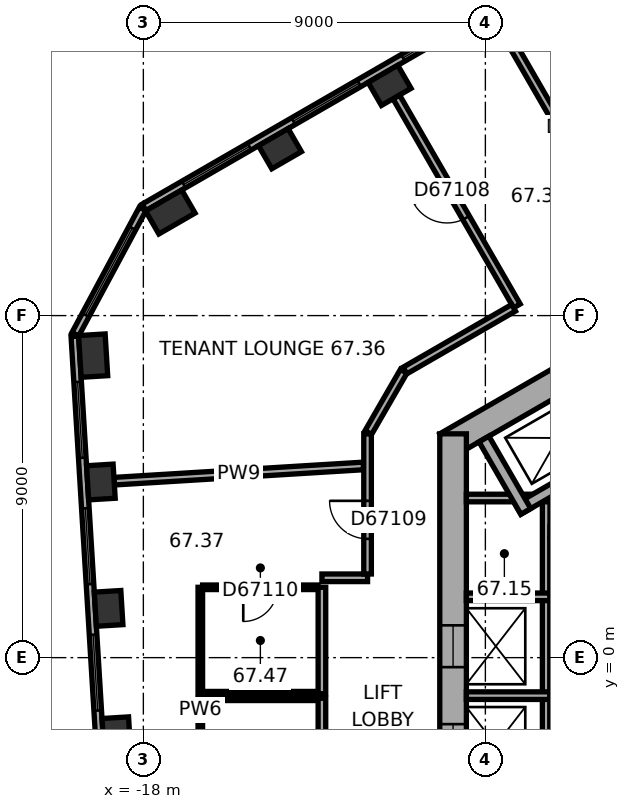
"""IFC4 building model, lengths in metres.
Left out: names, types, materials, properties, quantities, classifications, styles, units other than length and angle.
Written with IfcOpenShell. Run it as: python <this file> out.ifc"""

import sys

from ifc_helpers import new_model, si_unit, direction, frame, frame_2d, origin, origin_2d, place, context, subcontext, project, spatial, rectangle, extrude, element, fill, save


model = new_model("IFC4")
c1 = context("Model", 3, precision=1e-05, world=origin(), true_north=direction((0.0, 1.0)))
c2 = subcontext(c1, "Body", "Model", "MODEL_VIEW")
j1 = project(units=[si_unit("LENGTHUNIT", "METRE"), si_unit("PLANEANGLEUNIT", "RADIAN")], contexts=[c1])
p1 = place(None, origin())
s1 = spatial("IfcSite", under=j1, at=p1, CompositionType="ELEMENT")
p2 = place(p1, origin())
s2 = spatial("IfcBuilding", under=s1, at=p2, CompositionType="ELEMENT")
p3 = place(p2, frame((0.0, 0.0, 270.9)))
s3 = spatial("IfcBuildingStorey", under=s2, at=p3, CompositionType="ELEMENT", Elevation=270.9)
for number, where, z_axis, x_axis in (
    (1, (-11.52, 15.057, 0.0), (0.0, 0.0, 1.0), (-0.866, -0.5, 0.0)),
    (2, (-14.406, 13.391, 0.0), (0.0, 0.0, 1.0), (-0.866, -0.5, 0.0)),
):
    element("IfcColumn", number, at=place(p3, frame(where, z_axis=z_axis, x_axis=x_axis)), inside=s3, PredefinedType="COLUMN", context=c2, shape_type="SweptSolid", body=[
        extrude(rectangle(XDim=0.9, YDim=0.7, at=origin_2d()), origin(), (0.0, 0.0, 1.0), 3.7),
    ])
for number, where, z_axis, x_axis in (
    (3, (-17.291, 11.726, 0.0), (0.0, 0.0, 1.0), (-0.866, -0.5, 0.0)),
    (4, (-19.321, 7.947, 0.0), (0.0, 0.0, 1.0), (0.061, -0.998, 0.0)),
):
    element("IfcColumn", number, at=place(p3, frame(where, z_axis=z_axis, x_axis=x_axis)), inside=s3, PredefinedType="COLUMN", context=c2, shape_type="SweptSolid", body=[
        extrude(rectangle(XDim=1.1, YDim=0.7, at=origin_2d()), origin(), (0.0, 0.0, 1.0), 3.7),
    ])
for number, where, z_axis, x_axis in (
    (5, (-19.118, 4.621, 0.0), (0.0, 0.0, 1.0), (0.061, -0.998, 0.0)),
    (6, (-18.914, 1.296, 0.0), (0.0, 0.0, 1.0), (0.061, -0.998, 0.0)),
    (7, (-18.711, -2.03, 0.0), (0.0, 0.0, 1.0), (0.061, -0.998, 0.0)),
):
    element("IfcColumn", number, at=place(p3, frame(where, z_axis=z_axis, x_axis=x_axis)), inside=s3, PredefinedType="COLUMN", context=c2, shape_type="SweptSolid", body=[
        extrude(rectangle(XDim=0.9, YDim=0.7, at=origin_2d()), origin(), (0.0, 0.0, 1.0), 3.7),
    ])
p4 = place(p3, frame((0.175, 11.475, 0.0), z_axis=(0.0, 0.0, 1.0), x_axis=(-0.866026453023, -0.499998182661, 0.0)))
e8 = element("IfcWall", 8, at=p4, inside=s3, PredefinedType="SHEAR", context=c2, shape_type="SweptSolid", body=[
    extrude(rectangle(XDim=11.778, YDim=0.7, at=frame_2d((5.889, 0.0))), origin(), (0.0, 0.0, 1.0), 3.7),
])
p5 = place(p4, frame((6.089, 0.0, 0.0)))
e9 = element("IfcOpeningElement", 9, at=p5, cuts=e8, PredefinedType="OPENING", context=c2, shape_type="SweptSolid", body=[
    extrude(rectangle(XDim=1.5, YDim=2.1, at=frame_2d((0.75, 1.05))), frame((0.0, 0.36, 0.0), z_axis=(0.0, -1.0, 0.0), x_axis=(1.0, 0.0, 0.0)), (0.0, 0.0, 1.0), 0.72),
])
p6 = place(p4, frame((1.639, 0.0, 0.0)))
e10 = element("IfcOpeningElement", 10, at=p6, cuts=e8, PredefinedType="OPENING", context=c2, shape_type="SweptSolid", body=[
    extrude(rectangle(XDim=0.9, YDim=2.1, at=frame_2d((0.45, 1.05))), frame((0.0, 0.36, 0.0), z_axis=(0.0, -1.0, 0.0), x_axis=(1.0, 0.0, 0.0)), (0.0, 0.0, 1.0), 0.72),
])
p7 = place(p4, frame((4.239, 0.0, 0.0)))
e11 = element("IfcOpeningElement", 11, at=p7, cuts=e8, PredefinedType="OPENING", context=c2, shape_type="SweptSolid", body=[
    extrude(rectangle(XDim=0.9, YDim=2.1, at=frame_2d((0.45, 1.05))), frame((0.0, 0.36, 0.0), z_axis=(0.0, -1.0, 0.0), x_axis=(1.0, 0.0, 0.0)), (0.0, 0.0, 1.0), 0.72),
])
p8 = place(p3, frame((-9.85, 5.889, 0.0), z_axis=(0.0, 0.0, 1.0), x_axis=(0.0, -1.0, 0.0)))
e12 = element("IfcWall", 12, at=p8, inside=s3, PredefinedType="SHEAR", context=c2, shape_type="SweptSolid", body=[
    extrude(rectangle(XDim=11.778, YDim=0.7, at=frame_2d((5.889, 0.0))), origin(), (0.0, 0.0, 1.0), 3.7),
])
p9 = place(p8, frame((5.039, 0.0, 0.0)))
e13 = element("IfcOpeningElement", 13, at=p9, cuts=e12, PredefinedType="OPENING", context=c2, shape_type="SweptSolid", body=[
    extrude(rectangle(XDim=1.1, YDim=2.1, at=frame_2d((0.55, 1.05))), frame((0.0, 0.36, 0.0), z_axis=(0.0, -1.0, 0.0), x_axis=(1.0, 0.0, 0.0)), (0.0, 0.0, 1.0), 0.72),
])
p10 = place(p8, frame((7.639, 0.0, 0.0)))
e14 = element("IfcOpeningElement", 14, at=p10, cuts=e12, PredefinedType="OPENING", context=c2, shape_type="SweptSolid", body=[
    extrude(rectangle(XDim=1.1, YDim=2.1, at=frame_2d((0.55, 1.05))), frame((0.0, 0.36, 0.0), z_axis=(0.0, -1.0, 0.0), x_axis=(1.0, 0.0, 0.0)), (0.0, 0.0, 1.0), 0.72),
])
p11 = place(p3, frame((-2.624, 20.713, 0.0), z_axis=(0.0, 0.0, 1.0), x_axis=(-0.866026460444, -0.499998169808, 0.0)))
e15 = element("IfcWall", 15, at=p11, inside=s3, PredefinedType="STANDARD", context=c2, shape_type="SweptSolid", body=[
    extrude(rectangle(XDim=17.731, YDim=0.2, at=frame_2d((8.866, 0.0))), origin(), (0.0, 0.0, 1.0), 3.7),
])
p12 = place(p11, frame((1.203, 0.0, 0.9)))
e16 = element("IfcOpeningElement", 16, at=p12, cuts=e15, PredefinedType="OPENING", context=c2, shape_type="SweptSolid", body=[
    extrude(rectangle(XDim=2.0, YDim=2.0, at=frame_2d((1.0, 1.0))), frame((0.0, 0.11, 0.0), z_axis=(0.0, -1.0, 0.0), x_axis=(1.0, 0.0, 0.0)), (0.0, 0.0, 1.0), 0.22),
])
p13 = place(p11, frame((4.535, 0.0, 0.9)))
e17 = element("IfcOpeningElement", 17, at=p13, cuts=e15, PredefinedType="OPENING", context=c2, shape_type="SweptSolid", body=[
    extrude(rectangle(XDim=2.0, YDim=2.0, at=frame_2d((1.0, 1.0))), frame((0.0, 0.11, 0.0), z_axis=(0.0, -1.0, 0.0), x_axis=(1.0, 0.0, 0.0)), (0.0, 0.0, 1.0), 0.22),
])
p14 = place(p11, frame((7.867, 0.0, 0.9)))
e18 = element("IfcOpeningElement", 18, at=p14, cuts=e15, PredefinedType="OPENING", context=c2, shape_type="SweptSolid", body=[
    extrude(rectangle(XDim=2.0, YDim=2.0, at=frame_2d((1.0, 1.0))), frame((0.0, 0.11, 0.0), z_axis=(0.0, -1.0, 0.0), x_axis=(1.0, 0.0, 0.0)), (0.0, 0.0, 1.0), 0.22),
])
p15 = place(p11, frame((11.198, 0.0, 0.9)))
e19 = element("IfcOpeningElement", 19, at=p15, cuts=e15, PredefinedType="OPENING", context=c2, shape_type="SweptSolid", body=[
    extrude(rectangle(XDim=2.0, YDim=2.0, at=frame_2d((1.0, 1.0))), frame((0.0, 0.11, 0.0), z_axis=(0.0, -1.0, 0.0), x_axis=(1.0, 0.0, 0.0)), (0.0, 0.0, 1.0), 0.22),
])
p16 = place(p11, frame((14.53, 0.0, 0.9)))
e20 = element("IfcOpeningElement", 20, at=p16, cuts=e15, PredefinedType="OPENING", context=c2, shape_type="SweptSolid", body=[
    extrude(rectangle(XDim=2.0, YDim=2.0, at=frame_2d((1.0, 1.0))), frame((0.0, 0.11, 0.0), z_axis=(0.0, -1.0, 0.0), x_axis=(1.0, 0.0, 0.0)), (0.0, 0.0, 1.0), 0.22),
])
p17 = place(p3, frame((-18.018, 11.808, 0.0), z_axis=(0.0, 0.0, 1.0), x_axis=(-0.473318619185, -0.880891301315, 0.0)))
e21 = element("IfcWall", 21, at=p17, inside=s3, PredefinedType="STANDARD", context=c2, shape_type="SweptSolid", body=[
    extrude(rectangle(XDim=3.747, YDim=0.2, at=frame_2d((1.874, 0.0))), origin(), (0.0, 0.0, 1.0), 3.7),
])
p18 = place(p17, frame((0.573, 0.0, 0.9)))
e22 = element("IfcOpeningElement", 22, at=p18, cuts=e21, PredefinedType="OPENING", context=c2, shape_type="SweptSolid", body=[
    extrude(rectangle(XDim=2.6, YDim=2.0, at=frame_2d((1.3, 1.0))), frame((0.0, 0.11, 0.0), z_axis=(0.0, -1.0, 0.0), x_axis=(1.0, 0.0, 0.0)), (0.0, 0.0, 1.0), 0.22),
])
p19 = place(p3, frame((-19.803, 8.454, 0.0), z_axis=(0.0, 0.0, 1.0), x_axis=(0.061036717565, -0.998135521414, 0.0)))
e23 = element("IfcWall", 23, at=p19, inside=s3, PredefinedType="STANDARD", context=c2, shape_type="SweptSolid", body=[
    extrude(rectangle(XDim=17.731, YDim=0.2, at=frame_2d((8.866, 0.0))), origin(), (0.0, 0.0, 1.0), 3.7),
])
p20 = place(p19, frame((1.202, 0.0, 0.9)))
e24 = element("IfcOpeningElement", 24, at=p20, cuts=e23, PredefinedType="OPENING", context=c2, shape_type="SweptSolid", body=[
    extrude(rectangle(XDim=2.0, YDim=2.0, at=frame_2d((1.0, 1.0))), frame((0.0, 0.11, 0.0), z_axis=(0.0, -1.0, 0.0), x_axis=(1.0, 0.0, 0.0)), (0.0, 0.0, 1.0), 0.22),
])
p21 = place(p19, frame((4.533, 0.0, 0.9)))
e25 = element("IfcOpeningElement", 25, at=p21, cuts=e23, PredefinedType="OPENING", context=c2, shape_type="SweptSolid", body=[
    extrude(rectangle(XDim=2.0, YDim=2.0, at=frame_2d((1.0, 1.0))), frame((0.0, 0.11, 0.0), z_axis=(0.0, -1.0, 0.0), x_axis=(1.0, 0.0, 0.0)), (0.0, 0.0, 1.0), 0.22),
])
p22 = place(p19, frame((7.865, 0.0, 0.9)))
e26 = element("IfcOpeningElement", 26, at=p22, cuts=e23, PredefinedType="OPENING", context=c2, shape_type="SweptSolid", body=[
    extrude(rectangle(XDim=2.0, YDim=2.0, at=frame_2d((1.0, 1.0))), frame((0.0, 0.11, 0.0), z_axis=(0.0, -1.0, 0.0), x_axis=(1.0, 0.0, 0.0)), (0.0, 0.0, 1.0), 0.22),
])
p23 = place(p19, frame((11.197, 0.0, 0.9)))
e27 = element("IfcOpeningElement", 27, at=p23, cuts=e23, PredefinedType="OPENING", context=c2, shape_type="SweptSolid", body=[
    extrude(rectangle(XDim=2.0, YDim=2.0, at=frame_2d((1.0, 1.0))), frame((0.0, 0.11, 0.0), z_axis=(0.0, -1.0, 0.0), x_axis=(1.0, 0.0, 0.0)), (0.0, 0.0, 1.0), 0.22),
])
p24 = place(p19, frame((14.528, 0.0, 0.9)))
e28 = element("IfcOpeningElement", 28, at=p24, cuts=e23, PredefinedType="OPENING", context=c2, shape_type="SweptSolid", body=[
    extrude(rectangle(XDim=2.0, YDim=2.0, at=frame_2d((1.0, 1.0))), frame((0.0, 0.11, 0.0), z_axis=(0.0, -1.0, 0.0), x_axis=(1.0, 0.0, 0.0)), (0.0, 0.0, 1.0), 0.22),
])
p25 = place(p3, frame((-7.4, 4.3, 0.0), z_axis=(0.0, 0.0, 1.0), x_axis=(0.0, -1.0, 0.0)))
e29 = element("IfcWall", 29, at=p25, inside=s3, PredefinedType="PARTITIONING", context=c2, shape_type="SweptSolid", body=[
    extrude(rectangle(XDim=8.0, YDim=0.2, at=frame_2d((4.0, 0.0))), origin(), (0.0, 0.0, 1.0), 3.42),
])
for number, where, z_axis, x_axis in (
    (30, (-7.3, 4.2, 0.0), (0.0, 0.0, 1.0), (-1.0, 0.0, 0.0)),
    (31, (-7.3, 1.6, 0.0), (0.0, 0.0, 1.0), (-1.0, 0.0, 0.0)),
    (32, (-7.3, -1.0, 0.0), (0.0, 0.0, 1.0), (-1.0, 0.0, 0.0)),
):
    element("IfcWall", number, at=place(p3, frame(where, z_axis=z_axis, x_axis=x_axis)), inside=s3, PredefinedType="PARTITIONING", context=c2, shape_type="SweptSolid", body=[
        extrude(rectangle(XDim=2.2, YDim=0.2, at=frame_2d((1.1, 0.0))), origin(), (0.0, 0.0, 1.0), 3.42),
    ])
p26 = place(p3, frame((-5.24, 5.577, 0.0), z_axis=(0.0, 0.0, 1.0), x_axis=(-0.866014461049, -0.500018952895, 0.0)))
e33 = element("IfcWall", 33, at=p26, inside=s3, PredefinedType="SHEAR", context=c2, shape_type="SweptSolid", body=[
    extrude(rectangle(XDim=3.35, YDim=0.3, at=frame_2d((1.675, 0.0))), origin(), (0.0, 0.0, 1.0), 3.42),
])
p27 = place(p3, frame((-7.937, 3.847, 0.0), z_axis=(0.0, 0.0, 1.0), x_axis=(-0.50002983664, 0.866008176907, 0.0)))
e34 = element("IfcWall", 34, at=p27, inside=s3, PredefinedType="SHEAR", context=c2, shape_type="SweptSolid", body=[
    extrude(rectangle(XDim=2.2, YDim=0.3, at=frame_2d((1.1, 0.0))), origin(), (0.0, 0.0, 1.0), 3.42),
])
p28 = place(p3, frame((-18.768, 4.643, 0.0), z_axis=(0.0, 0.0, 1.0), x_axis=(0.99813496285, 0.0610458511, 0.0)))
e35 = element("IfcWall", 35, at=p28, inside=s3, PredefinedType="PARTITIONING", context=c2, shape_type="SweptSolid", body=[
    extrude(rectangle(XDim=6.571, YDim=0.2, at=frame_2d((3.285, 0.0))), origin(), (0.0, 0.0, 1.0), 3.42),
])
p29 = place(p3, frame((-16.501, -3.869, 0.0), z_axis=(0.0, 0.0, 1.0), x_axis=(0.0, 1.0, 0.0)))
e36 = element("IfcWall", 36, at=p29, inside=s3, PredefinedType="PARTITIONING", context=c2, shape_type="SweptSolid", body=[
    extrude(rectangle(XDim=2.8, YDim=0.12, at=frame_2d((1.4, 0.0))), origin(), (0.0, 0.0, 1.0), 3.42),
])
p30 = place(p29, frame((0.95, 0.0, 0.0)))
e37 = element("IfcOpeningElement", 37, at=p30, cuts=e36, PredefinedType="OPENING", context=c2, shape_type="SweptSolid", body=[
    extrude(rectangle(XDim=0.9, YDim=2.1, at=frame_2d((0.45, 1.05))), frame((0.0, 0.07, 0.0), z_axis=(0.0, -1.0, 0.0), x_axis=(1.0, 0.0, 0.0)), (0.0, 0.0, 1.0), 0.14),
])
p31 = place(p3, frame((-16.501, -0.949, 0.0), z_axis=(0.0, 0.0, 1.0), x_axis=(0.0, 1.0, 0.0)))
e38 = element("IfcWall", 38, at=p31, inside=s3, PredefinedType="PARTITIONING", context=c2, shape_type="SweptSolid", body=[
    extrude(rectangle(XDim=2.8, YDim=0.12, at=frame_2d((1.4, 0.0))), origin(), (0.0, 0.0, 1.0), 3.42),
])
p32 = place(p3, frame((-16.441, -1.069, 0.0), z_axis=(0.0, 0.0, 1.0), x_axis=(1.0, 0.0, 0.0)))
e39 = element("IfcWall", 39, at=p32, inside=s3, PredefinedType="PARTITIONING", context=c2, shape_type="SweptSolid", body=[
    extrude(rectangle(XDim=3.04, YDim=0.12, at=frame_2d((1.52, 0.0))), origin(), (0.0, 0.0, 1.0), 3.42),
])
p33 = place(p3, frame((-16.441, 1.851, 0.0), z_axis=(0.0, 0.0, 1.0), x_axis=(1.0, 0.0, 0.0)))
e40 = element("IfcWall", 40, at=p33, inside=s3, PredefinedType="PARTITIONING", context=c2, shape_type="SweptSolid", body=[
    extrude(rectangle(XDim=3.04, YDim=0.12, at=frame_2d((1.52, 0.0))), origin(), (0.0, 0.0, 1.0), 3.42),
])
p34 = place(p33, frame((1.07, 0.0, 0.0)))
e41 = element("IfcOpeningElement", 41, at=p34, cuts=e40, PredefinedType="OPENING", context=c2, shape_type="SweptSolid", body=[
    extrude(rectangle(XDim=0.9, YDim=2.1, at=frame_2d((0.45, 1.05))), frame((0.0, 0.07, 0.0), z_axis=(0.0, -1.0, 0.0), x_axis=(1.0, 0.0, 0.0)), (0.0, 0.0, 1.0), 0.14),
])
p35 = place(p3, frame((-13.401, -0.949, 0.0), z_axis=(0.0, 0.0, 1.0), x_axis=(-1.0, 0.0, 0.0)))
e42 = element("IfcWall", 42, at=p35, inside=s3, PredefinedType="PARTITIONING", context=c2, shape_type="SweptSolid", body=[
    extrude(rectangle(XDim=3.04, YDim=0.12, at=frame_2d((1.52, 0.0))), origin(), (0.0, 0.0, 1.0), 3.42),
])
p36 = place(p3, frame((-13.301, -1.069, 0.0), z_axis=(0.0, 0.0, 1.0), x_axis=(0.0, -1.0, 0.0)))
e43 = element("IfcWall", 43, at=p36, inside=s3, PredefinedType="PARTITIONING", context=c2, shape_type="SweptSolid", body=[
    extrude(rectangle(XDim=2.8, YDim=0.2, at=frame_2d((1.4, 0.0))), origin(), (0.0, 0.0, 1.0), 3.42),
])
p37 = place(p3, frame((-13.301, 1.851, 0.0), z_axis=(0.0, 0.0, 1.0), x_axis=(0.0, -1.0, 0.0)))
e44 = element("IfcWall", 44, at=p37, inside=s3, PredefinedType="PARTITIONING", context=c2, shape_type="SweptSolid", body=[
    extrude(rectangle(XDim=2.8, YDim=0.2, at=frame_2d((1.4, 0.0))), origin(), (0.0, 0.0, 1.0), 3.42),
])
p38 = place(p3, frame((-12.1, 2.101, 0.0), z_axis=(0.0, 0.0, 1.0), x_axis=(-1.0, 0.0, 0.0)))
e45 = element("IfcWall", 45, at=p38, inside=s3, PredefinedType="PARTITIONING", context=c2, shape_type="SweptSolid", body=[
    extrude(rectangle(XDim=1.201, YDim=0.2, at=frame_2d((0.601, 0.0))), origin(), (0.0, 0.0, 1.0), 3.42),
])
p39 = place(p3, frame((-12.1, 5.889, 0.0), z_axis=(0.0, 0.0, 1.0), x_axis=(0.0, -1.0, 0.0)))
e46 = element("IfcWall", 46, at=p39, inside=s3, PredefinedType="PARTITIONING", context=c2, shape_type="SweptSolid", body=[
    extrude(rectangle(XDim=3.688, YDim=0.2, at=frame_2d((1.844, 0.0))), origin(), (0.0, 0.0, 1.0), 3.42),
])
p40 = place(p39, frame((1.763, 0.0, 0.0)))
e47 = element("IfcOpeningElement", 47, at=p40, cuts=e46, PredefinedType="OPENING", context=c2, shape_type="SweptSolid", body=[
    extrude(rectangle(XDim=1.0, YDim=2.1, at=frame_2d((0.5, 1.05))), frame((0.0, 0.11, 0.0), z_axis=(0.0, -1.0, 0.0), x_axis=(1.0, 0.0, 0.0)), (0.0, 0.0, 1.0), 0.22),
])
p41 = place(p3, frame((-11.345, 14.754, 0.0), z_axis=(0.0, 0.0, 1.0), x_axis=(0.500005339912, -0.866022320763, 0.0)))
e48 = element("IfcWall", 48, at=p41, inside=s3, PredefinedType="PARTITIONING", context=c2, shape_type="SweptSolid", body=[
    extrude(rectangle(XDim=6.35, YDim=0.2, at=frame_2d((3.175, 0.0))), origin(), (0.0, 0.0, 1.0), 3.42),
])
p42 = place(p41, frame((2.675, 0.0, 0.0)))
e49 = element("IfcOpeningElement", 49, at=p42, cuts=e48, PredefinedType="OPENING", context=c2, shape_type="SweptSolid", body=[
    extrude(rectangle(XDim=1.0, YDim=2.1, at=frame_2d((0.5, 1.05))), frame((0.0, 0.11, 0.0), z_axis=(0.0, -1.0, 0.0), x_axis=(1.0, 0.0, 0.0)), (0.0, 0.0, 1.0), 0.22),
])
p43 = place(p3, frame((-11.15, 7.534, 0.0), z_axis=(0.0, 0.0, 1.0), x_axis=(-0.500063286585, -0.865988862174, 0.0)))
e50 = element("IfcWall", 50, at=p43, inside=s3, PredefinedType="PARTITIONING", context=c2, shape_type="SweptSolid", body=[
    extrude(rectangle(XDim=1.86, YDim=0.2, at=frame_2d((0.93, 0.0))), origin(), (0.0, 0.0, 1.0), 3.42),
])
p44 = place(p3, frame((-8.46, 16.42, 0.0), z_axis=(0.0, 0.0, 1.0), x_axis=(0.500005339912, -0.866022320763, 0.0)))
e51 = element("IfcWall", 51, at=p44, inside=s3, PredefinedType="PARTITIONING", context=c2, shape_type="SweptSolid", body=[
    extrude(rectangle(XDim=6.35, YDim=0.2, at=frame_2d((3.175, 0.0))), origin(), (0.0, 0.0, 1.0), 2.87),
])
p45 = place(p44, frame((2.675, 0.0, 0.0)))
e52 = element("IfcOpeningElement", 52, at=p45, cuts=e51, PredefinedType="OPENING", context=c2, shape_type="SweptSolid", body=[
    extrude(rectangle(XDim=1.0, YDim=2.1, at=frame_2d((0.5, 1.05))), frame((0.0, 0.11, 0.0), z_axis=(0.0, -1.0, 0.0), x_axis=(1.0, 0.0, 0.0)), (0.0, 0.0, 1.0), 0.22),
])
p46 = place(p3, frame((-8.257, 9.205, 0.0), z_axis=(0.0, 0.0, 1.0), x_axis=(-0.866031626602, -0.49998922161, 0.0)))
e53 = element("IfcWall", 53, at=p46, inside=s3, PredefinedType="PARTITIONING", context=c2, shape_type="SweptSolid", body=[
    extrude(rectangle(XDim=3.301, YDim=0.2, at=frame_2d((1.65, 0.0))), origin(), (0.0, 0.0, 1.0), 3.42),
])
p47 = place(p14, origin())
e54 = element("IfcWindow", 54, at=p47, inside=s3, PartitioningType="SINGLE_PANEL", PredefinedType="WINDOW", context=c2, shape_type="SweptSolid", body=[
    extrude(rectangle(XDim=2.0, YDim=2.0, at=frame_2d((1.0, 1.0))), frame((0.0, 0.03, 0.0), z_axis=(0.0, -1.0, 0.0), x_axis=(1.0, 0.0, 0.0)), (0.0, 0.0, 1.0), 0.06),
])
fill(e18, e54)
p48 = place(p15, origin())
e55 = element("IfcWindow", 55, at=p48, inside=s3, PartitioningType="SINGLE_PANEL", PredefinedType="WINDOW", context=c2, shape_type="SweptSolid", body=[
    extrude(rectangle(XDim=2.0, YDim=2.0, at=frame_2d((1.0, 1.0))), frame((0.0, 0.03, 0.0), z_axis=(0.0, -1.0, 0.0), x_axis=(1.0, 0.0, 0.0)), (0.0, 0.0, 1.0), 0.06),
])
fill(e19, e55)
p49 = place(p16, origin())
e56 = element("IfcWindow", 56, at=p49, inside=s3, PartitioningType="SINGLE_PANEL", PredefinedType="WINDOW", context=c2, shape_type="SweptSolid", body=[
    extrude(rectangle(XDim=2.0, YDim=2.0, at=frame_2d((1.0, 1.0))), frame((0.0, 0.03, 0.0), z_axis=(0.0, -1.0, 0.0), x_axis=(1.0, 0.0, 0.0)), (0.0, 0.0, 1.0), 0.06),
])
fill(e20, e56)
p50 = place(p18, origin())
e57 = element("IfcWindow", 57, at=p50, inside=s3, PartitioningType="SINGLE_PANEL", PredefinedType="WINDOW", context=c2, shape_type="SweptSolid", body=[
    extrude(rectangle(XDim=2.6, YDim=2.0, at=frame_2d((1.3, 1.0))), frame((0.0, 0.03, 0.0), z_axis=(0.0, -1.0, 0.0), x_axis=(1.0, 0.0, 0.0)), (0.0, 0.0, 1.0), 0.06),
])
fill(e22, e57)
p51 = place(p20, origin())
e58 = element("IfcWindow", 58, at=p51, inside=s3, PartitioningType="SINGLE_PANEL", PredefinedType="WINDOW", context=c2, shape_type="SweptSolid", body=[
    extrude(rectangle(XDim=2.0, YDim=2.0, at=frame_2d((1.0, 1.0))), frame((0.0, 0.03, 0.0), z_axis=(0.0, -1.0, 0.0), x_axis=(1.0, 0.0, 0.0)), (0.0, 0.0, 1.0), 0.06),
])
fill(e24, e58)
p52 = place(p21, origin())
e59 = element("IfcWindow", 59, at=p52, inside=s3, PartitioningType="SINGLE_PANEL", PredefinedType="WINDOW", context=c2, shape_type="SweptSolid", body=[
    extrude(rectangle(XDim=2.0, YDim=2.0, at=frame_2d((1.0, 1.0))), frame((0.0, 0.03, 0.0), z_axis=(0.0, -1.0, 0.0), x_axis=(1.0, 0.0, 0.0)), (0.0, 0.0, 1.0), 0.06),
])
fill(e25, e59)
p53 = place(p22, origin())
e60 = element("IfcWindow", 60, at=p53, inside=s3, PartitioningType="SINGLE_PANEL", PredefinedType="WINDOW", context=c2, shape_type="SweptSolid", body=[
    extrude(rectangle(XDim=2.0, YDim=2.0, at=frame_2d((1.0, 1.0))), frame((0.0, 0.03, 0.0), z_axis=(0.0, -1.0, 0.0), x_axis=(1.0, 0.0, 0.0)), (0.0, 0.0, 1.0), 0.06),
])
fill(e26, e60)
p54 = place(p9, origin())
e61 = element("IfcDoor", 61, at=p54, inside=s3, OperationType="DOUBLE_DOOR_SLIDING", PredefinedType="DOOR", context=c2, shape_type="SweptSolid", body=[
    extrude(rectangle(XDim=1.1, YDim=2.1, at=frame_2d((0.55, 1.05))), frame((0.0, 0.025, 0.0), z_axis=(0.0, -1.0, 0.0), x_axis=(1.0, 0.0, 0.0)), (0.0, 0.0, 1.0), 0.05),
])
fill(e13, e61)
p55 = place(p10, origin())
e62 = element("IfcDoor", 62, at=p55, inside=s3, OperationType="DOUBLE_DOOR_SLIDING", PredefinedType="DOOR", context=c2, shape_type="SweptSolid", body=[
    extrude(rectangle(XDim=1.1, YDim=2.1, at=frame_2d((0.55, 1.05))), frame((0.0, 0.025, 0.0), z_axis=(0.0, -1.0, 0.0), x_axis=(1.0, 0.0, 0.0)), (0.0, 0.0, 1.0), 0.05),
])
fill(e14, e62)
p56 = place(p42, origin())
e63 = element("IfcDoor", 63, at=p56, inside=s3, OperationType="SINGLE_SWING_LEFT", PredefinedType="DOOR", context=c2, shape_type="SweptSolid", body=[
    extrude(rectangle(XDim=1.0, YDim=2.1, at=frame_2d((0.5, 1.05))), frame((0.0, 0.025, 0.0), z_axis=(0.0, -1.0, 0.0), x_axis=(1.0, 0.0, 0.0)), (0.0, 0.0, 1.0), 0.05),
])
fill(e49, e63)
p57 = place(p40, origin())
e64 = element("IfcDoor", 64, at=p57, inside=s3, OperationType="SINGLE_SWING_LEFT", PredefinedType="DOOR", context=c2, shape_type="SweptSolid", body=[
    extrude(rectangle(XDim=1.0, YDim=2.1, at=frame_2d((0.5, 1.05))), frame((0.0, 0.025, 0.0), z_axis=(0.0, -1.0, 0.0), x_axis=(1.0, 0.0, 0.0)), (0.0, 0.0, 1.0), 0.05),
])
fill(e47, e64)
p58 = place(p34, origin())
e65 = element("IfcDoor", 65, at=p58, inside=s3, OperationType="SINGLE_SWING_LEFT", PredefinedType="DOOR", context=c2, shape_type="SweptSolid", body=[
    extrude(rectangle(XDim=0.9, YDim=2.1, at=frame_2d((0.45, 1.05))), frame((0.0, 0.025, 0.0), z_axis=(0.0, -1.0, 0.0), x_axis=(1.0, 0.0, 0.0)), (0.0, 0.0, 1.0), 0.05),
])
fill(e41, e65)
save(model, sys.argv[1])
